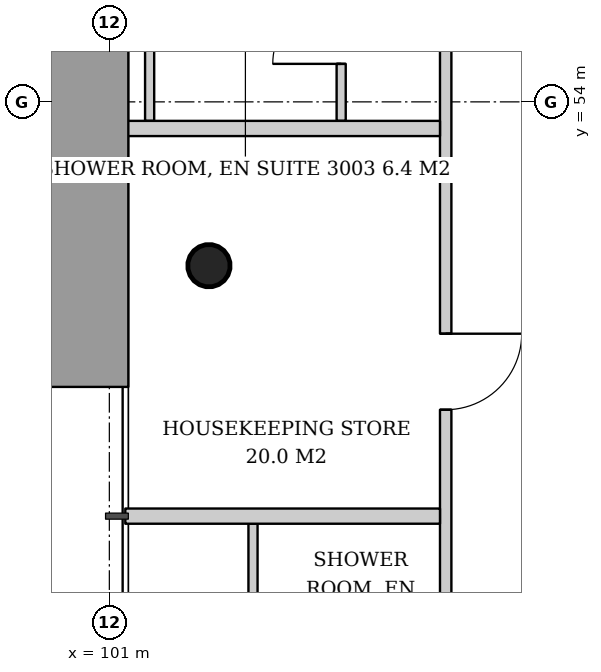
"""IFC4 building model, lengths in metres.
Left out: names, types, materials, properties, quantities, classifications, styles, units other than length and angle.
Written with IfcOpenShell. Run it as: python <this file> out.ifc"""

import sys

from ifc_helpers import new_model, si_unit, direction, frame, frame_2d, origin, origin_2d, place, context, subcontext, project, spatial, rectangle, hollow_circle, extrude, element, fill, save


model = new_model("IFC4")
c1 = context("Model", 3, precision=1e-05, world=origin(), true_north=direction((0.0, 1.0)))
c2 = subcontext(c1, "Body", "Model", "MODEL_VIEW")
j1 = project(units=[si_unit("LENGTHUNIT", "METRE"), si_unit("PLANEANGLEUNIT", "RADIAN")], contexts=[c1])
p1 = place(None, origin())
s1 = spatial("IfcSite", under=j1, at=p1, CompositionType="ELEMENT")
p2 = place(p1, origin())
s2 = spatial("IfcBuilding", under=s1, at=p2, CompositionType="ELEMENT")
p3 = place(p2, frame((0.0, 0.0, 119.8)))
s3 = spatial("IfcBuildingStorey", under=s2, at=p3, CompositionType="ELEMENT", Elevation=119.8)
p4 = place(p3, frame((102.259, 51.871, 0.0), z_axis=(0.043059584825, -0.021497706284, 0.998841188968), x_axis=(0.446680166538, 0.894693706707, 0.0)))
e1 = element("IfcColumn", 1, at=p4, inside=s3, PredefinedType="COLUMN", context=c2, shape_type="SweptSolid", body=[
    extrude(hollow_circle(Radius=0.28, WallThickness=0.02, at=origin_2d()), origin(), (0.0, 0.0, 1.0), 3.804),
])
p5 = place(p3, frame((104.05, 53.75, 0.0), z_axis=(0.0, 0.0, 1.0), x_axis=(0.0, 1.0, 0.0)))
e2 = element("IfcWall", 2, at=p5, inside=s3, PredefinedType="PARTITIONING", context=c2, shape_type="SweptSolid", body=[
    extrude(rectangle(XDim=2.58, YDim=0.12, at=frame_2d((1.29, 0.0))), origin(), (0.0, 0.0, 1.0), 2.9),
])
p6 = place(p5, frame((0.75, 0.0, 0.0)))
e3 = element("IfcOpeningElement", 3, at=p6, cuts=e2, PredefinedType="OPENING", context=c2, shape_type="SweptSolid", body=[
    extrude(rectangle(XDim=0.9, YDim=2.1, at=frame_2d((0.45, 1.05))), frame((0.0, 0.07, 0.0), z_axis=(0.0, -1.0, 0.0), x_axis=(1.0, 0.0, 0.0)), (0.0, 0.0, 1.0), 0.14),
])
p7 = place(p3, frame((101.53, 53.75, 0.0), z_axis=(0.0, 0.0, 1.0), x_axis=(0.0, 1.0, 0.0)))
e4 = element("IfcWall", 4, at=p7, inside=s3, PredefinedType="PARTITIONING", context=c2, shape_type="SweptSolid", body=[
    extrude(rectangle(XDim=2.58, YDim=0.12, at=frame_2d((1.29, 0.0))), origin(), (0.0, 0.0, 1.0), 3.6),
])
p8 = place(p3, frame((102.89, 48.45, 0.0), z_axis=(0.0, 0.0, 1.0), x_axis=(0.0, -1.0, 0.0)))
e5 = element("IfcWall", 5, at=p8, inside=s3, PredefinedType="PARTITIONING", context=c2, shape_type="SweptSolid", body=[
    extrude(rectangle(XDim=2.42, YDim=0.12, at=frame_2d((1.21, 0.0))), origin(), (0.0, 0.0, 1.0), 3.0),
])
p9 = place(p3, frame((105.425, 56.793, 0.0), z_axis=(0.0, 0.0, 1.0), x_axis=(0.0, -1.0, 0.0)))
e6 = element("IfcWall", 6, at=p9, inside=s3, PredefinedType="PARTITIONING", context=c2, shape_type="SweptSolid", body=[
    extrude(rectangle(XDim=21.586, YDim=0.15, at=frame_2d((10.793, 0.0))), origin(), (0.0, 0.0, 1.0), 2.9),
])
p10 = place(p9, frame((0.718, 0.0, 0.0)))
e7 = element("IfcOpeningElement", 7, at=p10, cuts=e6, PredefinedType="OPENING", context=c2, shape_type="SweptSolid", body=[
    extrude(rectangle(XDim=0.9, YDim=2.1, at=frame_2d((0.45, 1.05))), frame((0.0, 0.085, 0.0), z_axis=(0.0, -1.0, 0.0), x_axis=(1.0, 0.0, 0.0)), (0.0, 0.0, 1.0), 0.17),
])
p11 = place(p9, frame((5.843, 0.0, 0.0)))
e8 = element("IfcOpeningElement", 8, at=p11, cuts=e6, PredefinedType="OPENING", context=c2, shape_type="SweptSolid", body=[
    extrude(rectangle(XDim=1.0, YDim=2.1, at=frame_2d((0.5, 1.05))), frame((0.0, 0.085, 0.0), z_axis=(0.0, -1.0, 0.0), x_axis=(1.0, 0.0, 0.0)), (0.0, 0.0, 1.0), 0.17),
])
p12 = place(p9, frame((10.993, 0.0, 0.0)))
e9 = element("IfcOpeningElement", 9, at=p12, cuts=e6, PredefinedType="OPENING", context=c2, shape_type="SweptSolid", body=[
    extrude(rectangle(XDim=0.9, YDim=2.1, at=frame_2d((0.45, 1.05))), frame((0.0, 0.085, 0.0), z_axis=(0.0, -1.0, 0.0), x_axis=(1.0, 0.0, 0.0)), (0.0, 0.0, 1.0), 0.17),
])
for number, where, z_axis, x_axis in (
    (10, (105.35, 53.65, 0.0), (0.0, 0.0, 1.0), (-1.0, 0.0, 0.0)),
    (11, (105.35, 48.55, 0.0), (0.0, 0.0, 1.0), (-1.0, 0.0, 0.0)),
):
    element("IfcWall", number, at=place(p3, frame(where, z_axis=z_axis, x_axis=x_axis)), inside=s3, PredefinedType="PARTITIONING", context=c2, shape_type="SweptSolid", body=[
        extrude(rectangle(XDim=4.14, YDim=0.2, at=frame_2d((2.07, 0.0))), origin(), (0.0, 0.0, 1.0), 3.2),
    ])
p13 = place(p6, origin())
e12 = element("IfcDoor", 12, at=p13, inside=s3, OperationType="SINGLE_SWING_LEFT", PredefinedType="DOOR", context=c2, shape_type="SweptSolid", body=[
    extrude(rectangle(XDim=0.9, YDim=2.1, at=frame_2d((0.45, 1.05))), frame((0.0, 0.025, 0.0), z_axis=(0.0, -1.0, 0.0), x_axis=(1.0, 0.0, 0.0)), (0.0, 0.0, 1.0), 0.05),
])
fill(e3, e12)
p14 = place(p11, origin())
e13 = element("IfcDoor", 13, at=p14, inside=s3, OperationType="SINGLE_SWING_LEFT", PredefinedType="DOOR", context=c2, shape_type="SweptSolid", body=[
    extrude(rectangle(XDim=1.0, YDim=2.1, at=frame_2d((0.5, 1.05))), frame((0.0, 0.025, 0.0), z_axis=(0.0, -1.0, 0.0), x_axis=(1.0, 0.0, 0.0)), (0.0, 0.0, 1.0), 0.05),
])
fill(e8, e13)
save(model, sys.argv[1])
